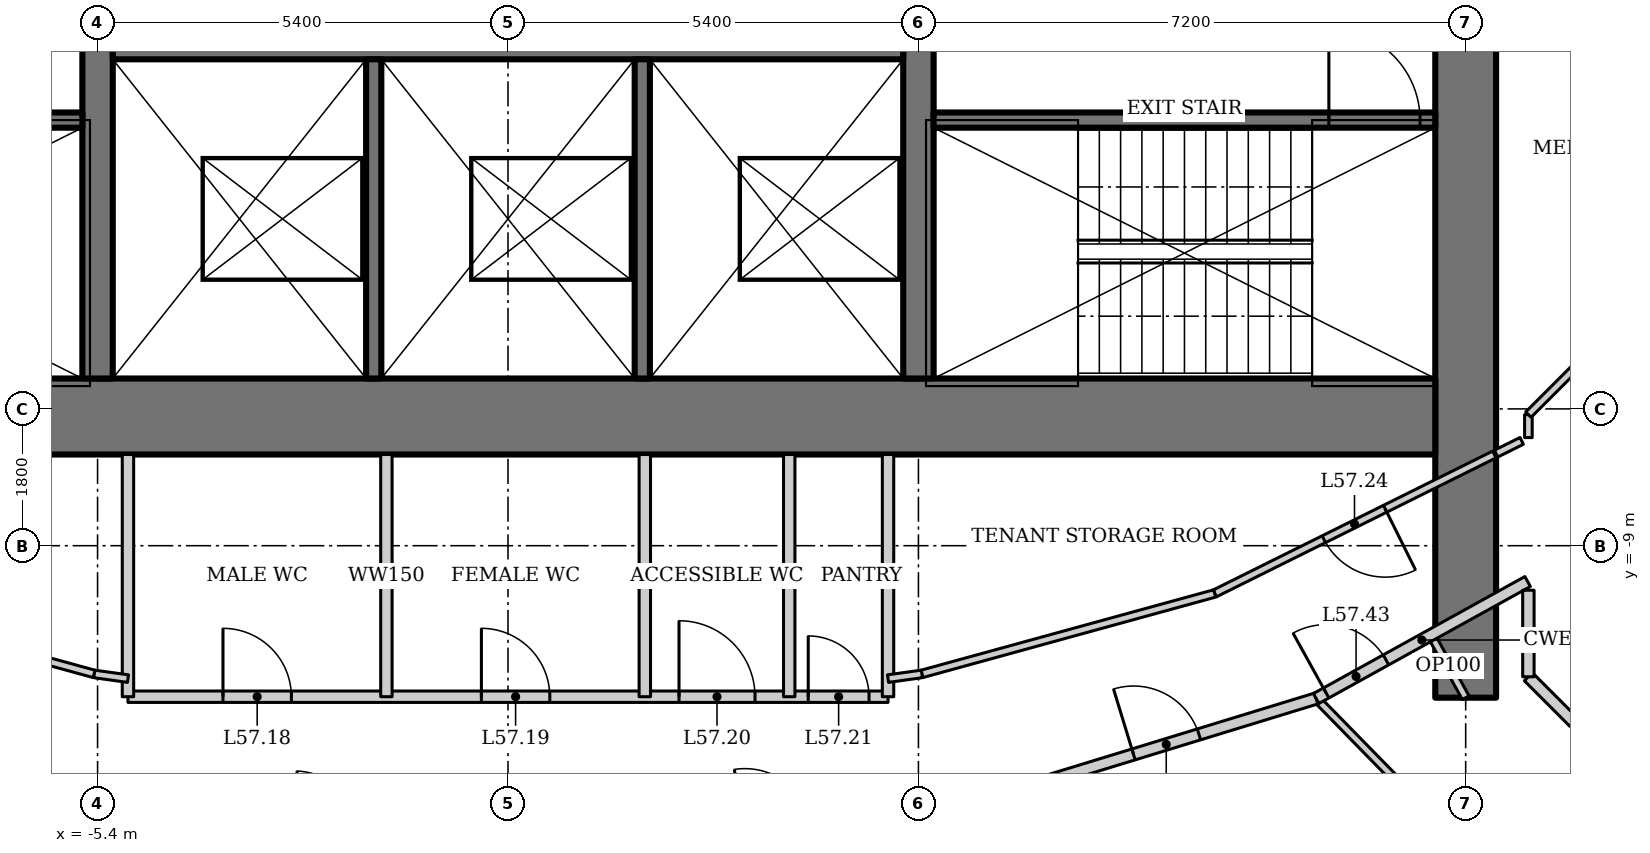
"""IFC4 building model, lengths in metres.
Left out: names, types, materials, properties, quantities, classifications, styles, units other than length and angle.
Written with IfcOpenShell. Run it as: python <this file> out.ifc"""

import sys

from ifc_helpers import new_model, si_unit, direction, frame, frame_2d, origin, place, context, subcontext, project, spatial, rectangle, extrude, element, fill, save


model = new_model("IFC4")
c1 = context("Model", 3, precision=1e-05, world=origin(), true_north=direction((0.0, 1.0)))
c2 = subcontext(c1, "Body", "Model", "MODEL_VIEW")
j1 = project(units=[si_unit("LENGTHUNIT", "METRE"), si_unit("PLANEANGLEUNIT", "RADIAN")], contexts=[c1])
p1 = place(None, origin())
s1 = spatial("IfcSite", under=j1, at=p1, CompositionType="ELEMENT")
p2 = place(p1, origin())
s2 = spatial("IfcBuilding", under=s1, at=p2, CompositionType="ELEMENT")
p3 = place(p2, frame((0.0, 0.0, 245.2)))
s3 = spatial("IfcBuildingStorey", under=s2, at=p3, CompositionType="ELEMENT", Elevation=245.2)
p4 = place(p3, frame((12.6, -11.0, 0.0), z_axis=(0.0, 0.0, 1.0), x_axis=(0.0, 1.0, 0.0)))
e1 = element("IfcWall", 1, at=p4, inside=s3, PredefinedType="SHEAR", context=c2, shape_type="SweptSolid", body=[
    extrude(rectangle(XDim=22.0, YDim=0.8, at=frame_2d((11.0, 0.0))), origin(), (0.0, 0.0, 1.0), 4.2),
])
p5 = place(p4, frame((10.1, 0.0, 0.0)))
e2 = element("IfcOpeningElement", 2, at=p5, cuts=e1, PredefinedType="OPENING", context=c2, shape_type="SweptSolid", body=[
    extrude(rectangle(XDim=1.8, YDim=2.1, at=frame_2d((0.9, 1.05))), frame((0.0, 0.41, 0.0), z_axis=(0.0, -1.0, 0.0), x_axis=(1.0, 0.0, 0.0)), (0.0, 0.0, 1.0), 0.82),
])
p6 = place(p3, frame((-12.2, -7.3, 0.0), z_axis=(0.0, 0.0, 1.0), x_axis=(1.0, 0.0, 0.0)))
e3 = element("IfcWall", 3, at=p6, inside=s3, PredefinedType="SHEAR", context=c2, shape_type="SweptSolid", body=[
    extrude(rectangle(XDim=24.4, YDim=1.0, at=frame_2d((12.2, 0.0))), origin(), (0.0, 0.0, 1.0), 4.2),
])
p7 = place(p3, frame((5.4, -6.8, 0.0), z_axis=(0.0, 0.0, 1.0), x_axis=(0.0, 1.0, 0.0)))
e4 = element("IfcWall", 4, at=p7, inside=s3, PredefinedType="SHEAR", context=c2, shape_type="SweptSolid", body=[
    extrude(rectangle(XDim=14.6, YDim=0.4, at=frame_2d((7.3, 0.0))), origin(), (0.0, 0.0, 1.0), 4.2),
])
p8 = place(p7, frame((5.9, 0.0, 0.0)))
e5 = element("IfcOpeningElement", 5, at=p8, cuts=e4, PredefinedType="OPENING", context=c2, shape_type="SweptSolid", body=[
    extrude(rectangle(XDim=1.8, YDim=2.1, at=frame_2d((0.9, 1.05))), frame((0.0, 0.21, 0.0), z_axis=(0.0, -1.0, 0.0), x_axis=(1.0, 0.0, 0.0)), (0.0, 0.0, 1.0), 0.42),
])
p9 = place(p3, frame((-5.4, 7.8, 0.0), z_axis=(0.0, 0.0, 1.0), x_axis=(0.0, -1.0, 0.0)))
e6 = element("IfcWall", 6, at=p9, inside=s3, PredefinedType="SHEAR", context=c2, shape_type="SweptSolid", body=[
    extrude(rectangle(XDim=14.6, YDim=0.4, at=frame_2d((7.3, 0.0))), origin(), (0.0, 0.0, 1.0), 4.2),
])
p10 = place(p9, frame((6.4, 0.0, 0.0)))
e7 = element("IfcOpeningElement", 7, at=p10, cuts=e6, PredefinedType="OPENING", context=c2, shape_type="SweptSolid", body=[
    extrude(rectangle(XDim=1.8, YDim=2.1, at=frame_2d((0.9, 1.05))), frame((0.0, 0.21, 0.0), z_axis=(0.0, -1.0, 0.0), x_axis=(1.0, 0.0, 0.0)), (0.0, 0.0, 1.0), 0.42),
])
p11 = place(p3, frame((-5.2, -2.4, 0.0), z_axis=(0.0, 0.0, 1.0), x_axis=(1.0, 0.0, 0.0)))
e8 = element("IfcWall", 8, at=p11, inside=s3, PredefinedType="SHEAR", context=c2, shape_type="SweptSolid", body=[
    extrude(rectangle(XDim=10.4, YDim=0.4, at=frame_2d((5.2, 0.0))), origin(), (0.0, 0.0, 1.0), 4.2),
])
p12 = place(p11, frame((1.683, 0.0, 0.0)))
e9 = element("IfcOpeningElement", 9, at=p12, cuts=e8, PredefinedType="OPENING", context=c2, shape_type="SweptSolid", body=[
    extrude(rectangle(XDim=1.1, YDim=2.2, at=frame_2d((0.55, 1.1))), frame((0.0, 0.21, 0.0), z_axis=(0.0, -1.0, 0.0), x_axis=(1.0, 0.0, 0.0)), (0.0, 0.0, 1.0), 0.42),
])
p13 = place(p11, frame((5.217, 0.0, 0.0)))
e10 = element("IfcOpeningElement", 10, at=p13, cuts=e8, PredefinedType="OPENING", context=c2, shape_type="SweptSolid", body=[
    extrude(rectangle(XDim=1.1, YDim=2.2, at=frame_2d((0.55, 1.1))), frame((0.0, 0.21, 0.0), z_axis=(0.0, -1.0, 0.0), x_axis=(1.0, 0.0, 0.0)), (0.0, 0.0, 1.0), 0.42),
])
p14 = place(p11, frame((8.75, 0.0, 0.0)))
e11 = element("IfcOpeningElement", 11, at=p14, cuts=e8, PredefinedType="OPENING", context=c2, shape_type="SweptSolid", body=[
    extrude(rectangle(XDim=1.1, YDim=2.2, at=frame_2d((0.55, 1.1))), frame((0.0, 0.21, 0.0), z_axis=(0.0, -1.0, 0.0), x_axis=(1.0, 0.0, 0.0)), (0.0, 0.0, 1.0), 0.42),
])
for number, where, z_axis, x_axis in (
    (12, (-1.767, -2.6, 0.0), (0.0, 0.0, 1.0), (0.0, -1.0, 0.0)),
    (13, (1.767, -2.6, 0.0), (0.0, 0.0, 1.0), (0.0, -1.0, 0.0)),
):
    element("IfcWall", number, at=place(p3, frame(where, z_axis=z_axis, x_axis=x_axis)), inside=s3, PredefinedType="SOLIDWALL", context=c2, shape_type="SweptSolid", body=[
        extrude(rectangle(XDim=4.2, YDim=0.2, at=frame_2d((2.1, 0.0))), origin(), (0.0, 0.0, 1.0), 4.2),
    ])
p15 = place(p3, frame((5.6, -3.4, 0.0), z_axis=(0.0, 0.0, 1.0), x_axis=(1.0, 0.0, 0.0)))
e14 = element("IfcWall", 14, at=p15, inside=s3, PredefinedType="SHEAR", context=c2, shape_type="SweptSolid", body=[
    extrude(rectangle(XDim=6.6, YDim=0.2, at=frame_2d((3.3, 0.0))), origin(), (0.0, 0.0, 1.0), 4.2),
])
p16 = place(p15, frame((5.2, 0.0, 0.0)))
e15 = element("IfcOpeningElement", 15, at=p16, cuts=e14, PredefinedType="OPENING", context=c2, shape_type="SweptSolid", body=[
    extrude(rectangle(XDim=1.2, YDim=2.1, at=frame_2d((0.6, 1.05))), frame((0.0, 0.11, 0.0), z_axis=(0.0, -1.0, 0.0), x_axis=(1.0, 0.0, 0.0)), (0.0, 0.0, 1.0), 0.22),
])
p17 = place(p3, frame((-5.6, -3.4, 0.0), z_axis=(0.0, 0.0, 1.0), x_axis=(-1.0, 0.0, 0.0)))
e16 = element("IfcWall", 16, at=p17, inside=s3, PredefinedType="SHEAR", context=c2, shape_type="SweptSolid", body=[
    extrude(rectangle(XDim=6.6, YDim=0.2, at=frame_2d((3.3, 0.0))), origin(), (0.0, 0.0, 1.0), 4.2),
])
p18 = place(p17, frame((5.2, 0.0, 0.0)))
e17 = element("IfcOpeningElement", 17, at=p18, cuts=e16, PredefinedType="OPENING", context=c2, shape_type="SweptSolid", body=[
    extrude(rectangle(XDim=1.2, YDim=2.1, at=frame_2d((0.6, 1.05))), frame((0.0, 0.11, 0.0), z_axis=(0.0, -1.0, 0.0), x_axis=(1.0, 0.0, 0.0)), (0.0, 0.0, 1.0), 0.22),
])
p19 = place(p3, frame((15.709, -16.199, 0.0), z_axis=(0.0, 0.0, 1.0), x_axis=(-0.699362525935, 0.714767135029, 0.0)))
e18 = element("IfcWall", 18, at=p19, inside=s3, PredefinedType="PARTITIONING", context=c2, shape_type="SweptSolid", body=[
    extrude(rectangle(XDim=7.259, YDim=0.1, at=frame_2d((3.629, 0.0))), origin(), (0.0, 0.0, 1.0), 3.41),
])
p20 = place(p3, frame((6.288, -12.341, 0.0), z_axis=(0.0, 0.0, 1.0), x_axis=(0.956185837153, 0.292760388079, 0.0)))
e19 = element("IfcWall", 19, at=p20, inside=s3, PredefinedType="PARTITIONING", context=c2, shape_type="SweptSolid", body=[
    extrude(rectangle(XDim=4.544, YDim=0.15, at=frame_2d((2.272, 0.0))), origin(), (0.0, 0.0, 1.0), 4.05),
])
p21 = place(p20, frame((2.031, 0.0, 0.0)))
e20 = element("IfcOpeningElement", 20, at=p21, cuts=e19, PredefinedType="OPENING", context=c2, shape_type="SweptSolid", body=[
    extrude(rectangle(XDim=0.9, YDim=2.1, at=frame_2d((0.45, 1.05))), frame((0.0, 0.085, 0.0), z_axis=(0.0, -1.0, 0.0), x_axis=(1.0, 0.0, 0.0)), (0.0, 0.0, 1.0), 0.17),
])
p22 = place(p3, frame((-5.0, -10.987, 0.0), z_axis=(0.0, 0.0, 1.0), x_axis=(1.0, 0.0, 0.0)))
e21 = element("IfcWall", 21, at=p22, inside=s3, PredefinedType="SOLIDWALL", context=c2, shape_type="SweptSolid", body=[
    extrude(rectangle(XDim=10.0, YDim=0.15, at=frame_2d((5.0, 0.0))), origin(), (0.0, 0.0, 1.0), 4.05),
])
p23 = place(p22, frame((1.25, 0.0, 0.0)))
e22 = element("IfcOpeningElement", 22, at=p23, cuts=e21, PredefinedType="OPENING", context=c2, shape_type="SweptSolid", body=[
    extrude(rectangle(XDim=0.9, YDim=2.1, at=frame_2d((0.45, 1.05))), frame((0.0, 0.085, 0.0), z_axis=(0.0, -1.0, 0.0), x_axis=(1.0, 0.0, 0.0)), (0.0, 0.0, 1.0), 0.17),
])
p24 = place(p22, frame((4.65, 0.0, 0.0)))
e23 = element("IfcOpeningElement", 23, at=p24, cuts=e21, PredefinedType="OPENING", context=c2, shape_type="SweptSolid", body=[
    extrude(rectangle(XDim=0.9, YDim=2.1, at=frame_2d((0.45, 1.05))), frame((0.0, 0.085, 0.0), z_axis=(0.0, -1.0, 0.0), x_axis=(1.0, 0.0, 0.0)), (0.0, 0.0, 1.0), 0.17),
])
p25 = place(p22, frame((7.25, 0.0, 0.0)))
e24 = element("IfcOpeningElement", 24, at=p25, cuts=e21, PredefinedType="OPENING", context=c2, shape_type="SweptSolid", body=[
    extrude(rectangle(XDim=1.0, YDim=2.1, at=frame_2d((0.5, 1.05))), frame((0.0, 0.085, 0.0), z_axis=(0.0, -1.0, 0.0), x_axis=(1.0, 0.0, 0.0)), (0.0, 0.0, 1.0), 0.17),
])
p26 = place(p22, frame((8.95, 0.0, 0.0)))
e25 = element("IfcOpeningElement", 25, at=p26, cuts=e21, PredefinedType="OPENING", context=c2, shape_type="SweptSolid", body=[
    extrude(rectangle(XDim=0.8, YDim=2.1, at=frame_2d((0.4, 1.05))), frame((0.0, 0.085, 0.0), z_axis=(0.0, -1.0, 0.0), x_axis=(1.0, 0.0, 0.0)), (0.0, 0.0, 1.0), 0.17),
])
for number, where, z_axis, x_axis in (
    (26, (-5.0, -7.8, 0.0), (0.0, 0.0, 1.0), (0.0, -1.0, 0.0)),
    (27, (5.0, -7.8, 0.0), (0.0, 0.0, 1.0), (0.0, -1.0, 0.0)),
    (28, (-1.6, -7.8, 0.0), (0.0, 0.0, 1.0), (0.0, -1.0, 0.0)),
):
    element("IfcWall", number, at=place(p3, frame(where, z_axis=z_axis, x_axis=x_axis)), inside=s3, PredefinedType="SOLIDWALL", context=c2, shape_type="SweptSolid", body=[
        extrude(rectangle(XDim=3.187, YDim=0.15, at=frame_2d((1.594, 0.0))), origin(), (0.0, 0.0, 1.0), 4.05),
    ])
p27 = place(p3, frame((1.8, -7.8, 0.0), z_axis=(0.0, 0.0, 1.0), x_axis=(0.0, -1.0, 0.0)))
e29 = element("IfcWall", 29, at=p27, inside=s3, PredefinedType="SOLIDWALL", context=c2, shape_type="SweptSolid", body=[
    extrude(rectangle(XDim=3.187, YDim=0.15, at=frame_2d((1.594, 0.0))), origin(), (0.0, 0.0, 1.0), 3.293),
])
p28 = place(p3, frame((3.7, -7.8, 0.0), z_axis=(0.0, 0.0, 1.0), x_axis=(0.0, -1.0, 0.0)))
e30 = element("IfcWall", 30, at=p28, inside=s3, PredefinedType="SOLIDWALL", context=c2, shape_type="SweptSolid", body=[
    extrude(rectangle(XDim=3.187, YDim=0.15, at=frame_2d((1.594, 0.0))), origin(), (0.0, 0.0, 1.0), 4.05),
])
p29 = place(p3, frame((-5.0, -10.749, 0.0), z_axis=(0.0, 0.0, 1.0), x_axis=(-0.990442882696, 0.137923515463, 0.0)))
e31 = element("IfcWall", 31, at=p29, inside=s3, PredefinedType="PARTITIONING", context=c2, shape_type="SweptSolid", body=[
    extrude(rectangle(XDim=0.45, YDim=0.1, at=frame_2d((0.225, 0.0))), origin(), (0.0, 0.0, 1.0), 4.05),
])
p30 = place(p3, frame((-5.445, -10.687, 0.0), z_axis=(0.0, 0.0, 1.0), x_axis=(-0.964244438722, 0.265014456954, 0.0)))
e32 = element("IfcWall", 32, at=p30, inside=s3, PredefinedType="PARTITIONING", context=c2, shape_type="SweptSolid", body=[
    extrude(rectangle(XDim=3.995, YDim=0.1, at=frame_2d((1.998, 0.0))), origin(), (0.0, 0.0, 1.0), 4.05),
])
p31 = place(p3, frame((12.977, -7.8, 0.0), z_axis=(0.0, 0.0, 1.0), x_axis=(-0.895529831139, -0.445001484874, 0.0)))
e33 = element("IfcWall", 33, at=p31, inside=s3, PredefinedType="PARTITIONING", context=c2, shape_type="SweptSolid", body=[
    extrude(rectangle(XDim=4.108, YDim=0.1, at=frame_2d((2.054, 0.0))), origin(), (0.0, 0.0, 1.0), 4.05),
])
p32 = place(p31, frame((1.604, 0.0, 0.0)))
e34 = element("IfcOpeningElement", 34, at=p32, cuts=e33, PredefinedType="OPENING", context=c2, shape_type="SweptSolid", body=[
    extrude(rectangle(XDim=0.9, YDim=2.1, at=frame_2d((0.45, 1.05))), frame((0.0, 0.06, 0.0), z_axis=(0.0, -1.0, 0.0), x_axis=(1.0, 0.0, 0.0)), (0.0, 0.0, 1.0), 0.12),
])
p33 = place(p3, frame((9.298, -9.628, 0.0), z_axis=(0.0, 0.0, 1.0), x_axis=(-0.964244438722, -0.265014456954, 0.0)))
e35 = element("IfcWall", 35, at=p33, inside=s3, PredefinedType="PARTITIONING", context=c2, shape_type="SweptSolid", body=[
    extrude(rectangle(XDim=3.995, YDim=0.1, at=frame_2d((1.998, 0.0))), origin(), (0.0, 0.0, 1.0), 4.05),
])
p34 = place(p3, frame((5.445, -10.687, 0.0), z_axis=(0.0, 0.0, 1.0), x_axis=(-0.990442882696, -0.137923515463, 0.0)))
e36 = element("IfcWall", 36, at=p34, inside=s3, PredefinedType="PARTITIONING", context=c2, shape_type="SweptSolid", body=[
    extrude(rectangle(XDim=0.45, YDim=0.1, at=frame_2d((0.225, 0.0))), origin(), (0.0, 0.0, 1.0), 4.05),
])
p35 = place(p3, frame((13.337, -7.621, 0.0), z_axis=(0.0, 0.0, 1.0), x_axis=(-0.895721570004, -0.444615416995, 0.0)))
e37 = element("IfcWall", 37, at=p35, inside=s3, PredefinedType="PARTITIONING", context=c2, shape_type="SweptSolid", body=[
    extrude(rectangle(XDim=0.376, YDim=0.1, at=frame_2d((0.188, 0.0))), origin(), (0.0, 0.0, 1.0), 4.05),
])
p36 = place(p3, frame((12.6, -11.0, 0.0), z_axis=(0.0, 0.0, 1.0), x_axis=(-0.484103558985, 0.875010710893, 0.0)))
e38 = element("IfcWall", 38, at=p36, inside=s3, PredefinedType="PARTITIONING", context=c2, shape_type="SweptSolid", body=[
    extrude(rectangle(XDim=0.943, YDim=0.1, at=frame_2d((0.472, 0.0))), origin(), (0.0, 0.0, 1.0), 4.05),
])
p37 = place(p3, frame((10.633, -11.01, 0.0), z_axis=(0.0, 0.0, 1.0), x_axis=(0.875072100837, 0.483992580869, 0.0)))
e39 = element("IfcWall", 39, at=p37, inside=s3, PredefinedType="PARTITIONING", context=c2, shape_type="SweptSolid", body=[
    extrude(rectangle(XDim=3.179, YDim=0.15, at=frame_2d((1.59, 0.0))), origin(), (0.0, 0.0, 1.0), 4.05),
])
p38 = place(p37, frame((0.15, 0.0, 0.0)))
e40 = element("IfcOpeningElement", 40, at=p38, cuts=e39, PredefinedType="OPENING", context=c2, shape_type="SweptSolid", body=[
    extrude(rectangle(XDim=0.9, YDim=2.1, at=frame_2d((0.45, 1.05))), frame((0.0, 0.085, 0.0), z_axis=(0.0, -1.0, 0.0), x_axis=(1.0, 0.0, 0.0)), (0.0, 0.0, 1.0), 0.17),
])
p39 = place(p3, frame((13.425, -7.578, 0.0), z_axis=(0.0, 0.0, 1.0), x_axis=(0.0, 1.0, 0.0)))
e41 = element("IfcWall", 41, at=p39, inside=s3, PredefinedType="PARTITIONING", context=c2, shape_type="SweptSolid", body=[
    extrude(rectangle(XDim=0.302, YDim=0.1, at=frame_2d((0.151, 0.0))), origin(), (0.0, 0.0, 1.0), 4.05),
])
p40 = place(p3, frame((13.425, -7.275, 0.0), z_axis=(0.0, 0.0, 1.0), x_axis=(0.707106781187, 0.707106781187, 0.0)))
e42 = element("IfcWall", 42, at=p40, inside=s3, PredefinedType="PARTITIONING", context=c2, shape_type="SweptSolid", body=[
    extrude(rectangle(XDim=0.849, YDim=0.1, at=frame_2d((0.425, 0.0))), origin(), (0.0, 0.0, 1.0), 4.05),
])
p41 = place(p3, frame((14.025, -11.325, 0.0), z_axis=(0.0, 0.0, 1.0), x_axis=(-0.707106781187, 0.707106781187, 0.0)))
e43 = element("IfcWall", 43, at=p41, inside=s3, PredefinedType="PARTITIONING", context=c2, shape_type="SweptSolid", body=[
    extrude(rectangle(XDim=0.849, YDim=0.15, at=frame_2d((0.425, 0.0))), origin(), (0.0, 0.0, 1.0), 4.05),
])
p42 = place(p3, frame((13.425, -10.725, 0.0), z_axis=(0.0, 0.0, 1.0), x_axis=(0.0, 1.0, 0.0)))
e44 = element("IfcWall", 44, at=p42, inside=s3, PredefinedType="PARTITIONING", context=c2, shape_type="SweptSolid", body=[
    extrude(rectangle(XDim=1.138, YDim=0.15, at=frame_2d((0.569, 0.0))), origin(), (0.0, 0.0, 1.0), 4.05),
])
p43 = place(p16, origin())
e45 = element("IfcDoor", 45, at=p43, inside=s3, OperationType="SINGLE_SWING_RIGHT", PredefinedType="DOOR", context=c2, shape_type="SweptSolid", body=[
    extrude(rectangle(XDim=1.2, YDim=2.1, at=frame_2d((0.6, 1.05))), frame((0.0, 0.025, 0.0), z_axis=(0.0, -1.0, 0.0), x_axis=(1.0, 0.0, 0.0)), (0.0, 0.0, 1.0), 0.05),
])
fill(e15, e45)
p44 = place(p23, origin())
e46 = element("IfcDoor", 46, at=p44, inside=s3, OperationType="SINGLE_SWING_LEFT", PredefinedType="DOOR", context=c2, shape_type="SweptSolid", body=[
    extrude(rectangle(XDim=0.9, YDim=2.1, at=frame_2d((0.45, 1.05))), frame((0.0, 0.025, 0.0), z_axis=(0.0, -1.0, 0.0), x_axis=(1.0, 0.0, 0.0)), (0.0, 0.0, 1.0), 0.05),
])
fill(e22, e46)
p45 = place(p24, origin())
e47 = element("IfcDoor", 47, at=p45, inside=s3, OperationType="SINGLE_SWING_LEFT", PredefinedType="DOOR", context=c2, shape_type="SweptSolid", body=[
    extrude(rectangle(XDim=0.9, YDim=2.1, at=frame_2d((0.45, 1.05))), frame((0.0, 0.025, 0.0), z_axis=(0.0, -1.0, 0.0), x_axis=(1.0, 0.0, 0.0)), (0.0, 0.0, 1.0), 0.05),
])
fill(e23, e47)
p46 = place(p25, origin())
e48 = element("IfcDoor", 48, at=p46, inside=s3, OperationType="SINGLE_SWING_LEFT", PredefinedType="DOOR", context=c2, shape_type="SweptSolid", body=[
    extrude(rectangle(XDim=1.0, YDim=2.1, at=frame_2d((0.5, 1.05))), frame((0.0, 0.025, 0.0), z_axis=(0.0, -1.0, 0.0), x_axis=(1.0, 0.0, 0.0)), (0.0, 0.0, 1.0), 0.05),
])
fill(e24, e48)
p47 = place(p26, origin())
e49 = element("IfcDoor", 49, at=p47, inside=s3, OperationType="SINGLE_SWING_LEFT", PredefinedType="DOOR", context=c2, shape_type="SweptSolid", body=[
    extrude(rectangle(XDim=0.8, YDim=2.1, at=frame_2d((0.4, 1.05))), frame((0.0, 0.025, 0.0), z_axis=(0.0, -1.0, 0.0), x_axis=(1.0, 0.0, 0.0)), (0.0, 0.0, 1.0), 0.05),
])
fill(e25, e49)
p48 = place(p32, origin())
e50 = element("IfcDoor", 50, at=p48, inside=s3, OperationType="SINGLE_SWING_LEFT", PredefinedType="DOOR", context=c2, shape_type="SweptSolid", body=[
    extrude(rectangle(XDim=0.9, YDim=2.1, at=frame_2d((0.45, 1.05))), frame((0.0, 0.025, 0.0), z_axis=(0.0, -1.0, 0.0), x_axis=(1.0, 0.0, 0.0)), (0.0, 0.0, 1.0), 0.05),
])
fill(e34, e50)
p49 = place(p21, origin())
e51 = element("IfcDoor", 51, at=p49, inside=s3, OperationType="SINGLE_SWING_LEFT", PredefinedType="DOOR", context=c2, shape_type="SweptSolid", body=[
    extrude(rectangle(XDim=0.9, YDim=2.1, at=frame_2d((0.45, 1.05))), frame((0.0, 0.025, 0.0), z_axis=(0.0, -1.0, 0.0), x_axis=(1.0, 0.0, 0.0)), (0.0, 0.0, 1.0), 0.05),
])
fill(e20, e51)
p50 = place(p38, origin())
e52 = element("IfcDoor", 52, at=p50, inside=s3, OperationType="SINGLE_SWING_LEFT", PredefinedType="DOOR", context=c2, shape_type="SweptSolid", body=[
    extrude(rectangle(XDim=0.9, YDim=2.1, at=frame_2d((0.45, 1.05))), frame((0.0, 0.025, 0.0), z_axis=(0.0, -1.0, 0.0), x_axis=(1.0, 0.0, 0.0)), (0.0, 0.0, 1.0), 0.05),
])
fill(e40, e52)
save(model, sys.argv[1])
